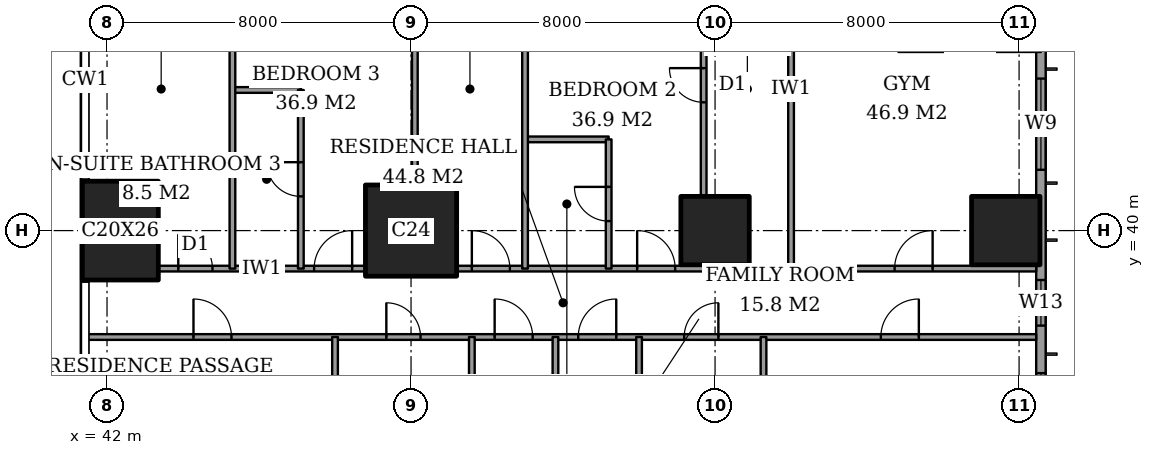
"""IFC4 building model, lengths in metres.
Left out: names, types, materials, properties, quantities, classifications, styles, units other than length and angle.
Written with IfcOpenShell. Run it as: python <this file> out.ifc"""

import sys

from ifc_helpers import new_model, si_unit, direction, frame, frame_2d, origin, origin_2d, place, context, subcontext, project, spatial, rectangle, extrude, element, fill, save


model = new_model("IFC4")
c1 = context("Model", 3, precision=1e-05, world=origin(), true_north=direction((0.0, 1.0)))
c2 = subcontext(c1, "Body", "Model", "MODEL_VIEW")
j1 = project(units=[si_unit("LENGTHUNIT", "METRE"), si_unit("PLANEANGLEUNIT", "RADIAN")], contexts=[c1])
p1 = place(None, origin())
s1 = spatial("IfcSite", under=j1, at=p1, CompositionType="ELEMENT")
p2 = place(p1, origin())
s2 = spatial("IfcBuilding", under=s1, at=p2, CompositionType="ELEMENT")
p3 = place(p2, frame((0.0, 0.0, 207.4)))
s3 = spatial("IfcBuildingStorey", under=s2, at=p3, CompositionType="ELEMENT", Elevation=207.4)
p4 = place(p3, frame((42.35, 40.0, 0.0), z_axis=(0.0, 0.0, 1.0), x_axis=(1.0, 0.0, 0.0)))
e1 = element("IfcColumn", 1, at=p4, inside=s3, PredefinedType="COLUMN", context=c2, shape_type="SweptSolid", body=[
    extrude(rectangle(XDim=2.0, YDim=2.6, at=origin_2d()), origin(), (0.0, 0.0, 1.0), 3.6),
])
p5 = place(p3, frame((50.0, 40.0, 0.0), z_axis=(0.0, 0.0, 1.0), x_axis=(1.0, 0.0, 0.0)))
e2 = element("IfcColumn", 2, at=p5, inside=s3, PredefinedType="COLUMN", context=c2, shape_type="SweptSolid", body=[
    extrude(rectangle(XDim=2.4, YDim=2.4, at=origin_2d()), origin(), (0.0, 0.0, 1.0), 3.6),
])
for number, where, z_axis, x_axis in (
    (3, (58.0, 40.0, 0.0), (0.0, 0.0, 1.0), (1.0, 0.0, 0.0)),
    (4, (65.65, 40.0, 0.0), (0.0, 0.0, 1.0), (1.0, 0.0, 0.0)),
):
    element("IfcColumn", number, at=place(p3, frame(where, z_axis=z_axis, x_axis=x_axis)), inside=s3, PredefinedType="COLUMN", context=c2, shape_type="SweptSolid", body=[
        extrude(rectangle(XDim=1.8, YDim=1.8, at=origin_2d()), origin(), (0.0, 0.0, 1.0), 3.6),
    ])
p6 = place(p3, frame((66.575, 3.175, 0.0), z_axis=(0.0, 0.0, 1.0), x_axis=(0.0, 1.0, 0.0)))
e5 = element("IfcWall", 5, at=p6, inside=s3, PredefinedType="SOLIDWALL", context=c2, shape_type="SweptSolid", body=[
    extrude(rectangle(XDim=41.65, YDim=0.25, at=frame_2d((20.825, 0.0))), origin(), (0.0, 0.0, 1.0), 3.6),
])
p7 = place(p6, frame((0.825, 0.0, 0.2)))
e6 = element("IfcOpeningElement", 6, at=p7, cuts=e5, PredefinedType="OPENING", context=c2, shape_type="SweptSolid", body=[
    extrude(rectangle(XDim=2.4, YDim=2.4, at=frame_2d((1.2, 1.2))), frame((0.0, 0.135, 0.0), z_axis=(0.0, -1.0, 0.0), x_axis=(1.0, 0.0, 0.0)), (0.0, 0.0, 1.0), 0.27),
])
p8 = place(p6, frame((6.6, 0.0, 0.2)))
e7 = element("IfcOpeningElement", 7, at=p8, cuts=e5, PredefinedType="OPENING", context=c2, shape_type="SweptSolid", body=[
    extrude(rectangle(XDim=1.2, YDim=2.4, at=frame_2d((0.6, 1.2))), frame((0.0, 0.135, 0.0), z_axis=(0.0, -1.0, 0.0), x_axis=(1.0, 0.0, 0.0)), (0.0, 0.0, 1.0), 0.27),
])
p9 = place(p6, frame((8.775, 0.0, 0.2)))
e8 = element("IfcOpeningElement", 8, at=p9, cuts=e5, PredefinedType="OPENING", context=c2, shape_type="SweptSolid", body=[
    extrude(rectangle(XDim=2.4, YDim=2.4, at=frame_2d((1.2, 1.2))), frame((0.0, 0.135, 0.0), z_axis=(0.0, -1.0, 0.0), x_axis=(1.0, 0.0, 0.0)), (0.0, 0.0, 1.0), 0.27),
])
p10 = place(p6, frame((15.675, 0.0, 0.2)))
e9 = element("IfcOpeningElement", 9, at=p10, cuts=e5, PredefinedType="OPENING", context=c2, shape_type="SweptSolid", body=[
    extrude(rectangle(XDim=2.4, YDim=2.4, at=frame_2d((1.2, 1.2))), frame((0.0, 0.135, 0.0), z_axis=(0.0, -1.0, 0.0), x_axis=(1.0, 0.0, 0.0)), (0.0, 0.0, 1.0), 0.27),
])
p11 = place(p6, frame((23.575, 0.0, 0.2)))
e10 = element("IfcOpeningElement", 10, at=p11, cuts=e5, PredefinedType="OPENING", context=c2, shape_type="SweptSolid", body=[
    extrude(rectangle(XDim=2.4, YDim=2.4, at=frame_2d((1.2, 1.2))), frame((0.0, 0.135, 0.0), z_axis=(0.0, -1.0, 0.0), x_axis=(1.0, 0.0, 0.0)), (0.0, 0.0, 1.0), 0.27),
])
p12 = place(p6, frame((30.675, 0.0, 0.2)))
e11 = element("IfcOpeningElement", 11, at=p12, cuts=e5, PredefinedType="OPENING", context=c2, shape_type="SweptSolid", body=[
    extrude(rectangle(XDim=2.4, YDim=2.4, at=frame_2d((1.2, 1.2))), frame((0.0, 0.135, 0.0), z_axis=(0.0, -1.0, 0.0), x_axis=(1.0, 0.0, 0.0)), (0.0, 0.0, 1.0), 0.27),
])
p13 = place(p6, frame((34.325, 0.0, 0.2)))
e12 = element("IfcOpeningElement", 12, at=p13, cuts=e5, PredefinedType="OPENING", context=c2, shape_type="SweptSolid", body=[
    extrude(rectangle(XDim=1.2, YDim=2.4, at=frame_2d((0.6, 1.2))), frame((0.0, 0.135, 0.0), z_axis=(0.0, -1.0, 0.0), x_axis=(1.0, 0.0, 0.0)), (0.0, 0.0, 1.0), 0.27),
])
p14 = place(p6, frame((38.425, 0.0, 0.2)))
e13 = element("IfcOpeningElement", 13, at=p14, cuts=e5, PredefinedType="OPENING", context=c2, shape_type="SweptSolid", body=[
    extrude(rectangle(XDim=2.4, YDim=2.4, at=frame_2d((1.2, 1.2))), frame((0.0, 0.135, 0.0), z_axis=(0.0, -1.0, 0.0), x_axis=(1.0, 0.0, 0.0)), (0.0, 0.0, 1.0), 0.27),
])
p15 = place(p3, frame((41.439, 37.2, 0.0), z_axis=(0.0, 0.0, 1.0), x_axis=(1.0, 0.0, 0.0)))
e14 = element("IfcWall", 14, at=p15, inside=s3, PredefinedType="PARTITIONING", context=c2, shape_type="SweptSolid", body=[
    extrude(rectangle(XDim=25.011, YDim=0.15, at=frame_2d((12.505, 0.0))), origin(), (0.0, 0.0, 1.0), 3.35),
])
p16 = place(p15, frame((10.761, 0.0, 0.0)))
e15 = element("IfcOpeningElement", 15, at=p16, cuts=e14, PredefinedType="OPENING", context=c2, shape_type="SweptSolid", body=[
    extrude(rectangle(XDim=1.0, YDim=2.1, at=frame_2d((0.5, 1.05))), frame((0.0, 0.085, 0.0), z_axis=(0.0, -1.0, 0.0), x_axis=(1.0, 0.0, 0.0)), (0.0, 0.0, 1.0), 0.17),
])
p17 = place(p15, frame((20.924, 0.0, 0.0)))
e16 = element("IfcOpeningElement", 16, at=p17, cuts=e14, PredefinedType="OPENING", context=c2, shape_type="SweptSolid", body=[
    extrude(rectangle(XDim=1.0, YDim=2.1, at=frame_2d((0.5, 1.05))), frame((0.0, 0.085, 0.0), z_axis=(0.0, -1.0, 0.0), x_axis=(1.0, 0.0, 0.0)), (0.0, 0.0, 1.0), 0.17),
])
p18 = place(p15, frame((15.749, 0.0, 0.0)))
e17 = element("IfcOpeningElement", 17, at=p18, cuts=e14, PredefinedType="OPENING", context=c2, shape_type="SweptSolid", body=[
    extrude(rectangle(XDim=0.9, YDim=2.1, at=frame_2d((0.45, 1.05))), frame((0.0, 0.085, 0.0), z_axis=(0.0, -1.0, 0.0), x_axis=(1.0, 0.0, 0.0)), (0.0, 0.0, 1.0), 0.17),
])
p19 = place(p15, frame((12.961, 0.0, 0.0)))
e18 = element("IfcOpeningElement", 18, at=p19, cuts=e14, PredefinedType="OPENING", context=c2, shape_type="SweptSolid", body=[
    extrude(rectangle(XDim=1.0, YDim=2.1, at=frame_2d((0.5, 1.05))), frame((0.0, 0.085, 0.0), z_axis=(0.0, -1.0, 0.0), x_axis=(1.0, 0.0, 0.0)), (0.0, 0.0, 1.0), 0.17),
])
p20 = place(p15, frame((7.911, 0.0, 0.0)))
e19 = element("IfcOpeningElement", 19, at=p20, cuts=e14, PredefinedType="OPENING", context=c2, shape_type="SweptSolid", body=[
    extrude(rectangle(XDim=0.9, YDim=2.1, at=frame_2d((0.45, 1.05))), frame((0.0, 0.085, 0.0), z_axis=(0.0, -1.0, 0.0), x_axis=(1.0, 0.0, 0.0)), (0.0, 0.0, 1.0), 0.17),
])
p21 = place(p15, frame((2.836, 0.0, 0.0)))
e20 = element("IfcOpeningElement", 20, at=p21, cuts=e14, PredefinedType="OPENING", context=c2, shape_type="SweptSolid", body=[
    extrude(rectangle(XDim=1.0, YDim=2.1, at=frame_2d((0.5, 1.05))), frame((0.0, 0.085, 0.0), z_axis=(0.0, -1.0, 0.0), x_axis=(1.0, 0.0, 0.0)), (0.0, 0.0, 1.0), 0.17),
])
p22 = place(p3, frame((43.35, 39.0, 0.0), z_axis=(0.0, 0.0, 1.0), x_axis=(1.0, 0.0, 0.0)))
e21 = element("IfcWall", 21, at=p22, inside=s3, PredefinedType="PARTITIONING", context=c2, shape_type="SweptSolid", body=[
    extrude(rectangle(XDim=5.45, YDim=0.15, at=frame_2d((2.725, 0.0))), origin(), (0.0, 0.0, 1.0), 3.35),
])
p23 = place(p22, frame((4.1, 0.0, 0.0)))
e22 = element("IfcOpeningElement", 22, at=p23, cuts=e21, PredefinedType="OPENING", context=c2, shape_type="SweptSolid", body=[
    extrude(rectangle(XDim=1.0, YDim=2.1, at=frame_2d((0.5, 1.05))), frame((0.0, 0.085, 0.0), z_axis=(0.0, -1.0, 0.0), x_axis=(1.0, 0.0, 0.0)), (0.0, 0.0, 1.0), 0.17),
])
p24 = place(p22, frame((0.525, 0.0, 0.0)))
e23 = element("IfcOpeningElement", 23, at=p24, cuts=e21, PredefinedType="OPENING", context=c2, shape_type="SweptSolid", body=[
    extrude(rectangle(XDim=0.9, YDim=2.1, at=frame_2d((0.45, 1.05))), frame((0.0, 0.085, 0.0), z_axis=(0.0, -1.0, 0.0), x_axis=(1.0, 0.0, 0.0)), (0.0, 0.0, 1.0), 0.17),
])
p25 = place(p3, frame((51.2, 39.0, 0.0), z_axis=(0.0, 0.0, 1.0), x_axis=(1.0, 0.0, 0.0)))
e24 = element("IfcWall", 24, at=p25, inside=s3, PredefinedType="PARTITIONING", context=c2, shape_type="SweptSolid", body=[
    extrude(rectangle(XDim=15.25, YDim=0.15, at=frame_2d((7.625, 0.0))), origin(), (0.0, 0.0, 1.0), 3.35),
])
p26 = place(p25, frame((11.525, 0.0, 0.0)))
e25 = element("IfcOpeningElement", 25, at=p26, cuts=e24, PredefinedType="OPENING", context=c2, shape_type="SweptSolid", body=[
    extrude(rectangle(XDim=1.0, YDim=2.1, at=frame_2d((0.5, 1.05))), frame((0.0, 0.085, 0.0), z_axis=(0.0, -1.0, 0.0), x_axis=(1.0, 0.0, 0.0)), (0.0, 0.0, 1.0), 0.17),
])
p27 = place(p25, frame((4.75, 0.0, 0.0)))
e26 = element("IfcOpeningElement", 26, at=p27, cuts=e24, PredefinedType="OPENING", context=c2, shape_type="SweptSolid", body=[
    extrude(rectangle(XDim=1.0, YDim=2.1, at=frame_2d((0.5, 1.05))), frame((0.0, 0.085, 0.0), z_axis=(0.0, -1.0, 0.0), x_axis=(1.0, 0.0, 0.0)), (0.0, 0.0, 1.0), 0.17),
])
p28 = place(p25, frame((0.4, 0.0, 0.0)))
e27 = element("IfcOpeningElement", 27, at=p28, cuts=e24, PredefinedType="OPENING", context=c2, shape_type="SweptSolid", body=[
    extrude(rectangle(XDim=1.0, YDim=2.1, at=frame_2d((0.5, 1.05))), frame((0.0, 0.085, 0.0), z_axis=(0.0, -1.0, 0.0), x_axis=(1.0, 0.0, 0.0)), (0.0, 0.0, 1.0), 0.17),
])
p29 = place(p3, frame((53.0, 42.4, 0.0), z_axis=(0.0, 0.0, 1.0), x_axis=(1.0, 0.0, 0.0)))
e28 = element("IfcWall", 28, at=p29, inside=s3, PredefinedType="PARTITIONING", context=c2, shape_type="SweptSolid", body=[
    extrude(rectangle(XDim=2.2, YDim=0.15, at=frame_2d((1.1, 0.0))), origin(), (0.0, 0.0, 1.0), 3.35),
])
p30 = place(p3, frame((45.3, 43.7, 0.0), z_axis=(0.0, 0.0, 1.0), x_axis=(1.0, 0.0, 0.0)))
e29 = element("IfcWall", 29, at=p30, inside=s3, PredefinedType="PARTITIONING", context=c2, shape_type="SweptSolid", body=[
    extrude(rectangle(XDim=1.8, YDim=0.15, at=frame_2d((0.9, 0.0))), origin(), (0.0, 0.0, 1.0), 3.35),
])
p31 = place(p3, frame((45.3, 39.0, 0.0), z_axis=(0.0, 0.0, 1.0), x_axis=(0.0, 1.0, 0.0)))
e30 = element("IfcWall", 30, at=p31, inside=s3, PredefinedType="PARTITIONING", context=c2, shape_type="SweptSolid", body=[
    extrude(rectangle(XDim=9.45, YDim=0.15, at=frame_2d((4.725, 0.0))), origin(), (0.0, 0.0, 1.0), 3.35),
])
p32 = place(p3, frame((47.1, 39.0, 0.0), z_axis=(0.0, 0.0, 1.0), x_axis=(0.0, 1.0, 0.0)))
e31 = element("IfcWall", 31, at=p32, inside=s3, PredefinedType="PARTITIONING", context=c2, shape_type="SweptSolid", body=[
    extrude(rectangle(XDim=4.7, YDim=0.15, at=frame_2d((2.35, 0.0))), origin(), (0.0, 0.0, 1.0), 3.35),
])
p33 = place(p32, frame((1.9, 0.0, 0.0)))
e32 = element("IfcOpeningElement", 32, at=p33, cuts=e31, PredefinedType="OPENING", context=c2, shape_type="SweptSolid", body=[
    extrude(rectangle(XDim=0.9, YDim=2.1, at=frame_2d((0.45, 1.05))), frame((0.0, 0.085, 0.0), z_axis=(0.0, -1.0, 0.0), x_axis=(1.0, 0.0, 0.0)), (0.0, 0.0, 1.0), 0.17),
])
p34 = place(p3, frame((48.0, 28.0, 0.0), z_axis=(0.0, 0.0, 1.0), x_axis=(0.0, 1.0, 0.0)))
e33 = element("IfcWall", 33, at=p34, inside=s3, PredefinedType="PARTITIONING", context=c2, shape_type="SweptSolid", body=[
    extrude(rectangle(XDim=9.2, YDim=0.15, at=frame_2d((4.6, 0.0))), origin(), (0.0, 0.0, 1.0), 3.35),
])
p35 = place(p34, frame((0.5, 0.0, 0.0)))
e34 = element("IfcOpeningElement", 34, at=p35, cuts=e33, PredefinedType="OPENING", context=c2, shape_type="SweptSolid", body=[
    extrude(rectangle(XDim=1.0, YDim=2.1, at=frame_2d((0.5, 1.05))), frame((0.0, 0.085, 0.0), z_axis=(0.0, -1.0, 0.0), x_axis=(1.0, 0.0, 0.0)), (0.0, 0.0, 1.0), 0.17),
])
p36 = place(p3, frame((50.1, 41.2, 0.0), z_axis=(0.0, 0.0, 1.0), x_axis=(0.0, 1.0, 0.0)))
e35 = element("IfcWall", 35, at=p36, inside=s3, PredefinedType="PARTITIONING", context=c2, shape_type="SweptSolid", body=[
    extrude(rectangle(XDim=5.55, YDim=0.15, at=frame_2d((2.775, 0.0))), origin(), (0.0, 0.0, 1.0), 3.35),
])
p37 = place(p3, frame((51.6, 30.0, 0.0), z_axis=(0.0, 0.0, 1.0), x_axis=(0.0, 1.0, 0.0)))
e36 = element("IfcWall", 36, at=p37, inside=s3, PredefinedType="PARTITIONING", context=c2, shape_type="SweptSolid", body=[
    extrude(rectangle(XDim=7.2, YDim=0.15, at=frame_2d((3.6, 0.0))), origin(), (0.0, 0.0, 1.0), 3.35),
])
p38 = place(p3, frame((53.0, 39.0, 0.0), z_axis=(0.0, 0.0, 1.0), x_axis=(0.0, 1.0, 0.0)))
e37 = element("IfcWall", 37, at=p38, inside=s3, PredefinedType="PARTITIONING", context=c2, shape_type="SweptSolid", body=[
    extrude(rectangle(XDim=9.45, YDim=0.15, at=frame_2d((4.725, 0.0))), origin(), (0.0, 0.0, 1.0), 3.35),
])
p39 = place(p3, frame((53.8, 30.0, 0.0), z_axis=(0.0, 0.0, 1.0), x_axis=(0.0, 1.0, 0.0)))
e38 = element("IfcWall", 38, at=p39, inside=s3, PredefinedType="PARTITIONING", context=c2, shape_type="SweptSolid", body=[
    extrude(rectangle(XDim=7.2, YDim=0.15, at=frame_2d((3.6, 0.0))), origin(), (0.0, 0.0, 1.0), 3.35),
])
p40 = place(p3, frame((55.2, 39.0, 0.0), z_axis=(0.0, 0.0, 1.0), x_axis=(0.0, 1.0, 0.0)))
e39 = element("IfcWall", 39, at=p40, inside=s3, PredefinedType="PARTITIONING", context=c2, shape_type="SweptSolid", body=[
    extrude(rectangle(XDim=3.4, YDim=0.15, at=frame_2d((1.7, 0.0))), origin(), (0.0, 0.0, 1.0), 3.35),
])
p41 = place(p40, frame((1.25, 0.0, 0.0)))
e40 = element("IfcOpeningElement", 40, at=p41, cuts=e39, PredefinedType="OPENING", context=c2, shape_type="SweptSolid", body=[
    extrude(rectangle(XDim=0.9, YDim=2.1, at=frame_2d((0.45, 1.05))), frame((0.0, 0.085, 0.0), z_axis=(0.0, -1.0, 0.0), x_axis=(1.0, 0.0, 0.0)), (0.0, 0.0, 1.0), 0.17),
])
p42 = place(p3, frame((56.0, 28.0, 0.0), z_axis=(0.0, 0.0, 1.0), x_axis=(0.0, 1.0, 0.0)))
e41 = element("IfcWall", 41, at=p42, inside=s3, PredefinedType="PARTITIONING", context=c2, shape_type="SweptSolid", body=[
    extrude(rectangle(XDim=9.2, YDim=0.15, at=frame_2d((4.6, 0.0))), origin(), (0.0, 0.0, 1.0), 3.35),
])
p43 = place(p42, frame((0.5, 0.0, 0.0)))
e42 = element("IfcOpeningElement", 42, at=p43, cuts=e41, PredefinedType="OPENING", context=c2, shape_type="SweptSolid", body=[
    extrude(rectangle(XDim=1.0, YDim=2.1, at=frame_2d((0.5, 1.05))), frame((0.0, 0.085, 0.0), z_axis=(0.0, -1.0, 0.0), x_axis=(1.0, 0.0, 0.0)), (0.0, 0.0, 1.0), 0.17),
])
p44 = place(p3, frame((57.7, 40.9, 0.0), z_axis=(0.0, 0.0, 1.0), x_axis=(0.0, 1.0, 0.0)))
e43 = element("IfcWall", 43, at=p44, inside=s3, PredefinedType="PARTITIONING", context=c2, shape_type="SweptSolid", body=[
    extrude(rectangle(XDim=5.85, YDim=0.15, at=frame_2d((2.925, 0.0))), origin(), (0.0, 0.0, 1.0), 3.35),
])
p45 = place(p44, frame((2.475, 0.0, 0.0)))
e44 = element("IfcOpeningElement", 44, at=p45, cuts=e43, PredefinedType="OPENING", context=c2, shape_type="SweptSolid", body=[
    extrude(rectangle(XDim=0.9, YDim=2.1, at=frame_2d((0.45, 1.05))), frame((0.0, 0.085, 0.0), z_axis=(0.0, -1.0, 0.0), x_axis=(1.0, 0.0, 0.0)), (0.0, 0.0, 1.0), 0.17),
])
p46 = place(p3, frame((59.275, 33.2, 0.0), z_axis=(0.0, 0.0, 1.0), x_axis=(0.0, 1.0, 0.0)))
e45 = element("IfcWall", 45, at=p46, inside=s3, PredefinedType="PARTITIONING", context=c2, shape_type="SweptSolid", body=[
    extrude(rectangle(XDim=4.0, YDim=0.15, at=frame_2d((2.0, 0.0))), origin(), (0.0, 0.0, 1.0), 3.35),
])
p47 = place(p3, frame((60.0, 39.0, 0.0), z_axis=(0.0, 0.0, 1.0), x_axis=(0.0, 1.0, 0.0)))
e46 = element("IfcWall", 46, at=p47, inside=s3, PredefinedType="PARTITIONING", context=c2, shape_type="SweptSolid", body=[
    extrude(rectangle(XDim=9.45, YDim=0.15, at=frame_2d((4.725, 0.0))), origin(), (0.0, 0.0, 1.0), 3.35),
])
p48 = place(p12, origin())
e47 = element("IfcWindow", 47, at=p48, inside=s3, PartitioningType="SINGLE_PANEL", PredefinedType="WINDOW", context=c2, shape_type="SweptSolid", body=[
    extrude(rectangle(XDim=2.4, YDim=2.4, at=frame_2d((1.2, 1.2))), frame((0.0, 0.03, 0.0), z_axis=(0.0, -1.0, 0.0), x_axis=(1.0, 0.0, 0.0)), (0.0, 0.0, 1.0), 0.06),
])
fill(e11, e47)
p49 = place(p13, origin())
e48 = element("IfcWindow", 48, at=p49, inside=s3, PartitioningType="SINGLE_PANEL", PredefinedType="WINDOW", context=c2, shape_type="SweptSolid", body=[
    extrude(rectangle(XDim=1.2, YDim=2.4, at=frame_2d((0.6, 1.2))), frame((0.0, 0.03, 0.0), z_axis=(0.0, -1.0, 0.0), x_axis=(1.0, 0.0, 0.0)), (0.0, 0.0, 1.0), 0.06),
])
fill(e12, e48)
p50 = place(p14, origin())
e49 = element("IfcWindow", 49, at=p50, inside=s3, PartitioningType="SINGLE_PANEL", PredefinedType="WINDOW", context=c2, shape_type="SweptSolid", body=[
    extrude(rectangle(XDim=2.4, YDim=2.4, at=frame_2d((1.2, 1.2))), frame((0.0, 0.03, 0.0), z_axis=(0.0, -1.0, 0.0), x_axis=(1.0, 0.0, 0.0)), (0.0, 0.0, 1.0), 0.06),
])
fill(e13, e49)
p51 = place(p26, origin())
e50 = element("IfcDoor", 50, at=p51, inside=s3, OperationType="SINGLE_SWING_LEFT", PredefinedType="DOOR", context=c2, shape_type="SweptSolid", body=[
    extrude(rectangle(XDim=1.0, YDim=2.1, at=frame_2d((0.5, 1.05))), frame((0.0, 0.025, 0.0), z_axis=(0.0, -1.0, 0.0), x_axis=(1.0, 0.0, 0.0)), (0.0, 0.0, 1.0), 0.05),
])
fill(e25, e50)
p52 = place(p45, origin())
e51 = element("IfcDoor", 51, at=p52, inside=s3, OperationType="SINGLE_SWING_LEFT", PredefinedType="DOOR", context=c2, shape_type="SweptSolid", body=[
    extrude(rectangle(XDim=0.9, YDim=2.1, at=frame_2d((0.45, 1.05))), frame((0.0, 0.025, 0.0), z_axis=(0.0, -1.0, 0.0), x_axis=(1.0, 0.0, 0.0)), (0.0, 0.0, 1.0), 0.05),
])
fill(e44, e51)
p53 = place(p41, origin())
e52 = element("IfcDoor", 52, at=p53, inside=s3, OperationType="SINGLE_SWING_LEFT", PredefinedType="DOOR", context=c2, shape_type="SweptSolid", body=[
    extrude(rectangle(XDim=0.9, YDim=2.1, at=frame_2d((0.45, 1.05))), frame((0.0, 0.025, 0.0), z_axis=(0.0, -1.0, 0.0), x_axis=(1.0, 0.0, 0.0)), (0.0, 0.0, 1.0), 0.05),
])
fill(e40, e52)
p54 = place(p27, origin())
e53 = element("IfcDoor", 53, at=p54, inside=s3, OperationType="SINGLE_SWING_RIGHT", PredefinedType="DOOR", context=c2, shape_type="SweptSolid", body=[
    extrude(rectangle(XDim=1.0, YDim=2.1, at=frame_2d((0.5, 1.05))), frame((0.0, 0.025, 0.0), z_axis=(0.0, -1.0, 0.0), x_axis=(1.0, 0.0, 0.0)), (0.0, 0.0, 1.0), 0.05),
])
fill(e26, e53)
p55 = place(p28, origin())
e54 = element("IfcDoor", 54, at=p55, inside=s3, OperationType="SINGLE_SWING_RIGHT", PredefinedType="DOOR", context=c2, shape_type="SweptSolid", body=[
    extrude(rectangle(XDim=1.0, YDim=2.1, at=frame_2d((0.5, 1.05))), frame((0.0, 0.025, 0.0), z_axis=(0.0, -1.0, 0.0), x_axis=(1.0, 0.0, 0.0)), (0.0, 0.0, 1.0), 0.05),
])
fill(e27, e54)
p56 = place(p33, origin())
e55 = element("IfcDoor", 55, at=p56, inside=s3, OperationType="SINGLE_SWING_LEFT", PredefinedType="DOOR", context=c2, shape_type="SweptSolid", body=[
    extrude(rectangle(XDim=0.9, YDim=2.1, at=frame_2d((0.45, 1.05))), frame((0.0, 0.025, 0.0), z_axis=(0.0, -1.0, 0.0), x_axis=(1.0, 0.0, 0.0)), (0.0, 0.0, 1.0), 0.05),
])
fill(e32, e55)
p57 = place(p23, origin())
e56 = element("IfcDoor", 56, at=p57, inside=s3, OperationType="SINGLE_SWING_LEFT", PredefinedType="DOOR", context=c2, shape_type="SweptSolid", body=[
    extrude(rectangle(XDim=1.0, YDim=2.1, at=frame_2d((0.5, 1.05))), frame((0.0, 0.025, 0.0), z_axis=(0.0, -1.0, 0.0), x_axis=(1.0, 0.0, 0.0)), (0.0, 0.0, 1.0), 0.05),
])
fill(e22, e56)
p58 = place(p24, origin())
e57 = element("IfcDoor", 57, at=p58, inside=s3, OperationType="SINGLE_SWING_RIGHT", PredefinedType="DOOR", context=c2, shape_type="SweptSolid", body=[
    extrude(rectangle(XDim=0.9, YDim=2.1, at=frame_2d((0.45, 1.05))), frame((0.0, 0.025, 0.0), z_axis=(0.0, -1.0, 0.0), x_axis=(1.0, 0.0, 0.0)), (0.0, 0.0, 1.0), 0.05),
])
fill(e23, e57)
p59 = place(p16, origin())
e58 = element("IfcDoor", 58, at=p59, inside=s3, OperationType="SINGLE_SWING_RIGHT", PredefinedType="DOOR", context=c2, shape_type="SweptSolid", body=[
    extrude(rectangle(XDim=1.0, YDim=2.1, at=frame_2d((0.5, 1.05))), frame((0.0, 0.025, 0.0), z_axis=(0.0, -1.0, 0.0), x_axis=(1.0, 0.0, 0.0)), (0.0, 0.0, 1.0), 0.05),
])
fill(e15, e58)
p60 = place(p17, origin())
e59 = element("IfcDoor", 59, at=p60, inside=s3, OperationType="SINGLE_SWING_LEFT", PredefinedType="DOOR", context=c2, shape_type="SweptSolid", body=[
    extrude(rectangle(XDim=1.0, YDim=2.1, at=frame_2d((0.5, 1.05))), frame((0.0, 0.025, 0.0), z_axis=(0.0, -1.0, 0.0), x_axis=(1.0, 0.0, 0.0)), (0.0, 0.0, 1.0), 0.05),
])
fill(e16, e59)
p61 = place(p18, origin())
e60 = element("IfcDoor", 60, at=p61, inside=s3, OperationType="SINGLE_SWING_LEFT", PredefinedType="DOOR", context=c2, shape_type="SweptSolid", body=[
    extrude(rectangle(XDim=0.9, YDim=2.1, at=frame_2d((0.45, 1.05))), frame((0.0, 0.025, 0.0), z_axis=(0.0, -1.0, 0.0), x_axis=(1.0, 0.0, 0.0)), (0.0, 0.0, 1.0), 0.05),
])
fill(e17, e60)
p62 = place(p19, origin())
e61 = element("IfcDoor", 61, at=p62, inside=s3, OperationType="SINGLE_SWING_LEFT", PredefinedType="DOOR", context=c2, shape_type="SweptSolid", body=[
    extrude(rectangle(XDim=1.0, YDim=2.1, at=frame_2d((0.5, 1.05))), frame((0.0, 0.025, 0.0), z_axis=(0.0, -1.0, 0.0), x_axis=(1.0, 0.0, 0.0)), (0.0, 0.0, 1.0), 0.05),
])
fill(e18, e61)
p63 = place(p20, origin())
e62 = element("IfcDoor", 62, at=p63, inside=s3, OperationType="SINGLE_SWING_RIGHT", PredefinedType="DOOR", context=c2, shape_type="SweptSolid", body=[
    extrude(rectangle(XDim=0.9, YDim=2.1, at=frame_2d((0.45, 1.05))), frame((0.0, 0.025, 0.0), z_axis=(0.0, -1.0, 0.0), x_axis=(1.0, 0.0, 0.0)), (0.0, 0.0, 1.0), 0.05),
])
fill(e19, e62)
p64 = place(p21, origin())
e63 = element("IfcDoor", 63, at=p64, inside=s3, OperationType="SINGLE_SWING_RIGHT", PredefinedType="DOOR", context=c2, shape_type="SweptSolid", body=[
    extrude(rectangle(XDim=1.0, YDim=2.1, at=frame_2d((0.5, 1.05))), frame((0.0, 0.025, 0.0), z_axis=(0.0, -1.0, 0.0), x_axis=(1.0, 0.0, 0.0)), (0.0, 0.0, 1.0), 0.05),
])
fill(e20, e63)
save(model, sys.argv[1])
